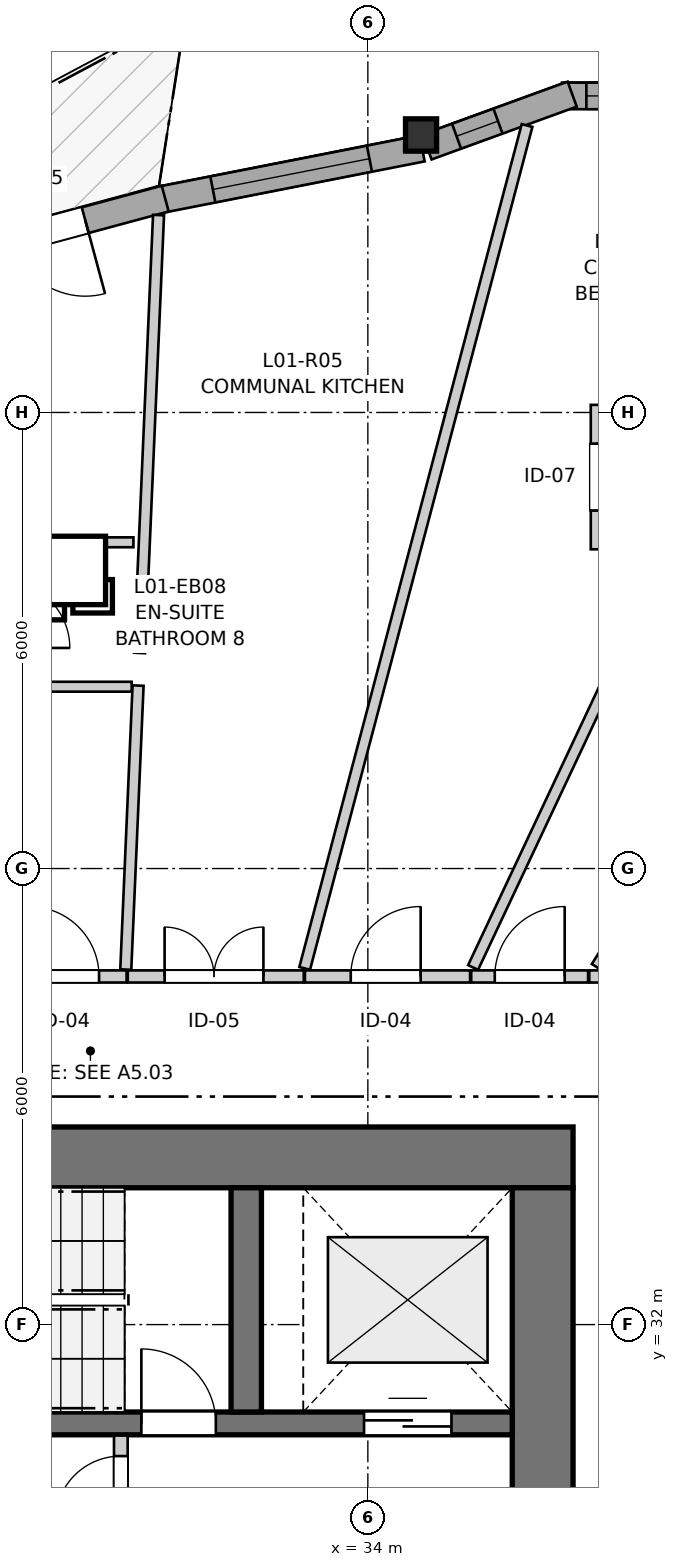
"""IFC4 building model, lengths in metres.
Left out: names, types, materials, properties, quantities, classifications, styles, units other than length and angle.
Written with IfcOpenShell. Run it as: python <this file> out.ifc"""

import sys

from ifc_helpers import new_model, si_unit, direction, frame, frame_2d, origin, origin_2d, place, context, subcontext, project, spatial, rectangle, i_section, extrude, source, transform, mapped, element, fill, save


model = new_model("IFC4")
c1 = context("Model", 3, precision=1e-05, world=origin(), true_north=direction((0.0, 1.0)))
c2 = subcontext(c1, "Body", "Model", "MODEL_VIEW")
j1 = project(units=[si_unit("LENGTHUNIT", "METRE"), si_unit("PLANEANGLEUNIT", "RADIAN")], contexts=[c1])
p1 = place(None, origin())
s1 = spatial("IfcSite", under=j1, at=p1, CompositionType="ELEMENT")
p2 = place(p1, origin())
s2 = spatial("IfcBuilding", under=s1, at=p2, CompositionType="ELEMENT")
p3 = place(p2, frame((0.0, 0.0, 7.8)))
s3 = spatial("IfcBuildingStorey", under=s2, at=p3, CompositionType="ELEMENT", Elevation=7.8)
p4 = place(p3, frame((36.7, 34.2, 0.0), z_axis=(0.0, 0.0, 1.0), x_axis=(-1.0, 0.0, 0.0)))
e1 = element("IfcWall", 1, at=p4, inside=s3, PredefinedType="SHEAR", context=c2, shape_type="SweptSolid", body=[
    extrude(rectangle(XDim=12.7, YDim=0.8, at=frame_2d((6.35, 0.0))), origin(), (0.0, 0.0, 1.0), 2.94),
])
p5 = place(p3, frame((36.3, 18.2, 0.0), z_axis=(0.0, 0.0, 1.0), x_axis=(0.0, 1.0, 0.0)))
e2 = element("IfcWall", 2, at=p5, inside=s3, PredefinedType="SHEAR", context=c2, shape_type="SweptSolid", body=[
    extrude(rectangle(XDim=15.6, YDim=0.8, at=frame_2d((7.8, 0.0))), origin(), (0.0, 0.0, 1.0), 2.94),
])
p6 = place(p5, frame((4.25, 0.0, 0.0)))
e3 = element("IfcOpeningElement", 3, at=p6, cuts=e2, PredefinedType="OPENING", context=c2, shape_type="SweptSolid", body=[
    extrude(rectangle(XDim=1.1, YDim=2.15, at=frame_2d((0.55, 1.075))), frame((0.0, 0.41, 0.0), z_axis=(0.0, -1.0, 0.0), x_axis=(1.0, 0.0, 0.0)), (0.0, 0.0, 1.0), 0.82),
])
p7 = place(p5, frame((10.25, 0.0, 0.0)))
e4 = element("IfcOpeningElement", 4, at=p7, cuts=e2, PredefinedType="OPENING", context=c2, shape_type="SweptSolid", body=[
    extrude(rectangle(XDim=1.1, YDim=2.15, at=frame_2d((0.55, 1.075))), frame((0.0, 0.41, 0.0), z_axis=(0.0, -1.0, 0.0), x_axis=(1.0, 0.0, 0.0)), (0.0, 0.0, 1.0), 0.82),
])
p8 = place(p3, frame((24.8, 30.7, 0.0), z_axis=(0.0, 0.0, 1.0), x_axis=(1.0, 0.0, 0.0)))
e5 = element("IfcWall", 5, at=p8, inside=s3, PredefinedType="SHEAR", context=c2, shape_type="SweptSolid", body=[
    extrude(rectangle(XDim=11.1, YDim=0.3, at=frame_2d((5.55, 0.0))), origin(), (0.0, 0.0, 1.0), 2.94),
])
p9 = place(p8, frame((6.22, 0.0, 0.0)))
e6 = element("IfcOpeningElement", 6, at=p9, cuts=e5, PredefinedType="OPENING", context=c2, shape_type="SweptSolid", body=[
    extrude(rectangle(XDim=0.98, YDim=2.15, at=frame_2d((0.49, 1.075))), frame((0.0, 0.16, 0.0), z_axis=(0.0, -1.0, 0.0), x_axis=(1.0, 0.0, 0.0)), (0.0, 0.0, 1.0), 0.32),
])
p10 = place(p8, frame((9.15, 0.0, 0.0)))
e7 = element("IfcOpeningElement", 7, at=p10, cuts=e5, PredefinedType="OPENING", context=c2, shape_type="SweptSolid", body=[
    extrude(rectangle(XDim=1.15, YDim=2.15, at=frame_2d((0.575, 1.075))), frame((0.0, 0.16, 0.0), z_axis=(0.0, -1.0, 0.0), x_axis=(1.0, 0.0, 0.0)), (0.0, 0.0, 1.0), 0.32),
])
p11 = place(p3, frame((32.4, 30.85, 0.0), z_axis=(0.0, 0.0, 1.0), x_axis=(0.0, 1.0, 0.0)))
e8 = element("IfcWall", 8, at=p11, inside=s3, PredefinedType="SHEAR", context=c2, shape_type="SweptSolid", body=[
    extrude(rectangle(XDim=2.95, YDim=0.4, at=frame_2d((1.475, 0.0))), origin(), (0.0, 0.0, 1.0), 2.94),
])
m1 = source(origin(), c2, "Body", "SweptSolid", [
    extrude(i_section(OverallWidth=0.409, OverallDepth=0.425, WebThickness=0.03, FlangeThickness=0.048, FilletRadius=0.015, at=origin_2d()), origin(), (0.0, 0.0, 1.0), 2.94),
])
p12 = place(p3, frame((34.7, 47.651, 0.0), z_axis=(0.0, 0.0, 1.0), x_axis=(1.0, 0.0, 0.0)))
e9 = element("IfcColumn", 9, at=p12, inside=s3, PredefinedType="PILASTER", context=c2, shape_type="MappedRepresentation", body=[
    mapped(m1, transform((0.0, 0.0, 0.0), x_axis=(1.0, 0.0, 0.0), y_axis=(0.0, 1.0, 0.0), z_axis=(0.0, 0.0, 1.0), scale=1.0)),
])
p13 = place(p3, frame((38.645, 48.165, 0.0), z_axis=(0.0, 0.0, 1.0), x_axis=(-1.0, 0.0, 0.0)))
e10 = element("IfcWall", 10, at=p13, inside=s3, PredefinedType="SOLIDWALL", context=c2, shape_type="SweptSolid", body=[
    extrude(rectangle(XDim=2.091, YDim=0.35, at=frame_2d((1.045, 0.0))), origin(), (0.0, 0.0, 1.0), 2.42),
])
p14 = place(p13, frame((0.32, 0.0, 0.82)))
e11 = element("IfcOpeningElement", 11, at=p14, cuts=e10, PredefinedType="OPENING", context=c2, shape_type="SweptSolid", body=[
    extrude(rectangle(XDim=1.45, YDim=1.25, at=frame_2d((0.725, 0.625))), frame((0.0, 0.185, 0.0), z_axis=(0.0, -1.0, 0.0), x_axis=(1.0, 0.0, 0.0)), (0.0, 0.0, 1.0), 0.37),
])
p15 = place(p3, frame((36.688, 48.188, 0.0), z_axis=(0.0, 0.0, 1.0), x_axis=(-0.939653047052, -0.342128851701, 0.0)))
e12 = element("IfcWall", 12, at=p15, inside=s3, PredefinedType="SOLIDWALL", context=c2, shape_type="SweptSolid", body=[
    extrude(rectangle(XDim=2.032, YDim=0.35, at=frame_2d((1.016, 0.0))), origin(), (0.0, 0.0, 1.0), 2.42),
])
p16 = place(p15, frame((1.039, 0.0, 0.82)))
e13 = element("IfcOpeningElement", 13, at=p16, cuts=e12, PredefinedType="OPENING", context=c2, shape_type="SweptSolid", body=[
    extrude(rectangle(XDim=0.58, YDim=1.35, at=frame_2d((0.29, 0.675))), frame((0.0, 0.185, 0.0), z_axis=(0.0, -1.0, 0.0), x_axis=(1.0, 0.0, 0.0)), (0.0, 0.0, 1.0), 0.37),
])
p17 = place(p3, frame((34.714, 47.475, 0.0), z_axis=(0.0, 0.0, 1.0), x_axis=(-0.981221268425, -0.192885516282, 0.0)))
e14 = element("IfcWall", 14, at=p17, inside=s3, PredefinedType="SOLIDWALL", context=c2, shape_type="SweptSolid", body=[
    extrude(rectangle(XDim=3.533, YDim=0.35, at=frame_2d((1.766, 0.0))), origin(), (0.0, 0.0, 1.0), 2.42),
])
p18 = place(p17, frame((0.706, 0.0, 0.82)))
e15 = element("IfcOpeningElement", 15, at=p18, cuts=e14, PredefinedType="OPENING", context=c2, shape_type="SweptSolid", body=[
    extrude(rectangle(XDim=2.1, YDim=1.4, at=frame_2d((1.05, 0.7))), frame((0.0, 0.185, 0.0), z_axis=(0.0, -1.0, 0.0), x_axis=(1.0, 0.0, 0.0)), (0.0, 0.0, 1.0), 0.37),
])
p19 = place(p3, frame((31.333, 46.814, 0.0), z_axis=(0.0, 0.0, 1.0), x_axis=(-0.965456905924, -0.260562780926, 0.0)))
e16 = element("IfcWall", 16, at=p19, inside=s3, PredefinedType="SOLIDWALL", context=c2, shape_type="SweptSolid", body=[
    extrude(rectangle(XDim=3.179, YDim=0.35, at=frame_2d((1.59, 0.0))), origin(), (0.0, 0.0, 1.0), 2.42),
])
p20 = place(p19, frame((1.09, 0.0, 0.0)))
e17 = element("IfcOpeningElement", 17, at=p20, cuts=e16, PredefinedType="OPENING", context=c2, shape_type="SweptSolid", body=[
    extrude(rectangle(XDim=1.0, YDim=2.1, at=frame_2d((0.5, 1.05))), frame((0.0, 0.185, 0.0), z_axis=(0.0, -1.0, 0.0), x_axis=(1.0, 0.0, 0.0)), (0.0, 0.0, 1.0), 0.37),
])
p21 = place(p3, frame((30.75, 27.43, 0.0), z_axis=(0.0, 0.0, 1.0), x_axis=(0.0, 1.0, 0.0)))
e18 = element("IfcWall", 18, at=p21, inside=s3, PredefinedType="PARTITIONING", context=c2, shape_type="SweptSolid", body=[
    extrude(rectangle(XDim=3.11, YDim=0.18, at=frame_2d((1.555, 0.0))), origin(), (0.0, 0.0, 1.0), 2.94),
])
p22 = place(p21, frame((1.98, 0.0, 0.0)))
e19 = element("IfcOpeningElement", 19, at=p22, cuts=e18, PredefinedType="OPENING", context=c2, shape_type="SweptSolid", body=[
    extrude(rectangle(XDim=0.86, YDim=2.05, at=frame_2d((0.43, 1.025))), frame((0.0, 0.1, 0.0), z_axis=(0.0, -1.0, 0.0), x_axis=(1.0, 0.0, 0.0)), (0.0, 0.0, 1.0), 0.2),
])
p23 = place(p3, frame((27.756, 36.58, 0.0), z_axis=(0.0, 0.0, 1.0), x_axis=(1.0, 0.0, 0.0)))
e20 = element("IfcWall", 20, at=p23, inside=s3, PredefinedType="PARTITIONING", context=c2, shape_type="SweptSolid", body=[
    extrude(rectangle(XDim=3.07, YDim=0.16, at=frame_2d((1.535, 0.0))), origin(), (0.0, 0.0, 1.0), 2.94),
])
p24 = place(p23, frame((1.788, 0.0, 0.0)))
e21 = element("IfcOpeningElement", 21, at=p24, cuts=e20, PredefinedType="OPENING", context=c2, shape_type="SweptSolid", body=[
    extrude(rectangle(XDim=0.92, YDim=2.1, at=frame_2d((0.46, 1.05))), frame((0.0, 0.09, 0.0), z_axis=(0.0, -1.0, 0.0), x_axis=(1.0, 0.0, 0.0)), (0.0, 0.0, 1.0), 0.18),
])
p25 = place(p3, frame((30.841, 36.58, 0.0), z_axis=(0.0, 0.0, 1.0), x_axis=(1.0, 0.0, 0.0)))
e22 = element("IfcWall", 22, at=p25, inside=s3, PredefinedType="PARTITIONING", context=c2, shape_type="SweptSolid", body=[
    extrude(rectangle(XDim=2.316, YDim=0.16, at=frame_2d((1.158, 0.0))), origin(), (0.0, 0.0, 1.0), 2.94),
])
p26 = place(p25, frame((0.485, 0.0, 0.0)))
e23 = element("IfcOpeningElement", 23, at=p26, cuts=e22, PredefinedType="OPENING", context=c2, shape_type="SweptSolid", body=[
    extrude(rectangle(XDim=1.3, YDim=2.1, at=frame_2d((0.65, 1.05))), frame((0.0, 0.09, 0.0), z_axis=(0.0, -1.0, 0.0), x_axis=(1.0, 0.0, 0.0)), (0.0, 0.0, 1.0), 0.18),
])
p27 = place(p3, frame((33.172, 36.58, 0.0), z_axis=(0.0, 0.0, 1.0), x_axis=(1.0, 0.0, 0.0)))
e24 = element("IfcWall", 24, at=p27, inside=s3, PredefinedType="PARTITIONING", context=c2, shape_type="SweptSolid", body=[
    extrude(rectangle(XDim=2.173, YDim=0.16, at=frame_2d((1.086, 0.0))), origin(), (0.0, 0.0, 1.0), 2.94),
])
p28 = place(p27, frame((0.603, 0.0, 0.0)))
e25 = element("IfcOpeningElement", 25, at=p28, cuts=e24, PredefinedType="OPENING", context=c2, shape_type="SweptSolid", body=[
    extrude(rectangle(XDim=0.92, YDim=2.1, at=frame_2d((0.46, 1.05))), frame((0.0, 0.09, 0.0), z_axis=(0.0, -1.0, 0.0), x_axis=(1.0, 0.0, 0.0)), (0.0, 0.0, 1.0), 0.18),
])
p29 = place(p3, frame((36.998, 44.1, 0.0), z_axis=(0.0, 0.0, 1.0), x_axis=(0.0, -1.0, 0.0)))
e26 = element("IfcWall", 26, at=p29, inside=s3, PredefinedType="PARTITIONING", context=c2, shape_type="SweptSolid", body=[
    extrude(rectangle(XDim=1.9, YDim=0.13, at=frame_2d((0.95, 0.0))), origin(), (0.0, 0.0, 1.0), 2.94),
])
p30 = place(p29, frame((0.51, 0.0, 0.0)))
e27 = element("IfcOpeningElement", 27, at=p30, cuts=e26, PredefinedType="OPENING", context=c2, shape_type="SweptSolid", body=[
    extrude(rectangle(XDim=0.88, YDim=2.05, at=frame_2d((0.44, 1.025))), frame((0.0, 0.075, 0.0), z_axis=(0.0, -1.0, 0.0), x_axis=(1.0, 0.0, 0.0)), (0.0, 0.0, 1.0), 0.15),
])
p31 = place(p3, frame((36.913, 36.58, 0.0), z_axis=(0.0, 0.0, 1.0), x_axis=(1.0, 0.0, 0.0)))
e28 = element("IfcWall", 28, at=p31, inside=s3, PredefinedType="PARTITIONING", context=c2, shape_type="SweptSolid", body=[
    extrude(rectangle(XDim=1.767, YDim=0.16, at=frame_2d((0.883, 0.0))), origin(), (0.0, 0.0, 1.0), 2.94),
])
p32 = place(p31, frame((0.22, 0.0, 0.0)))
e29 = element("IfcOpeningElement", 29, at=p32, cuts=e28, PredefinedType="OPENING", context=c2, shape_type="SweptSolid", body=[
    extrude(rectangle(XDim=0.92, YDim=2.1, at=frame_2d((0.46, 1.05))), frame((0.0, 0.09, 0.0), z_axis=(0.0, -1.0, 0.0), x_axis=(1.0, 0.0, 0.0)), (0.0, 0.0, 1.0), 0.18),
])
p33 = place(p3, frame((35.36, 36.58, 0.0), z_axis=(0.0, 0.0, 1.0), x_axis=(1.0, 0.0, 0.0)))
e30 = element("IfcWall", 30, at=p33, inside=s3, PredefinedType="PARTITIONING", context=c2, shape_type="SweptSolid", body=[
    extrude(rectangle(XDim=1.538, YDim=0.16, at=frame_2d((0.769, 0.0))), origin(), (0.0, 0.0, 1.0), 2.94),
])
p34 = place(p33, frame((0.31, 0.0, 0.0)))
e31 = element("IfcOpeningElement", 31, at=p34, cuts=e30, PredefinedType="OPENING", context=c2, shape_type="SweptSolid", body=[
    extrude(rectangle(XDim=0.92, YDim=2.1, at=frame_2d((0.46, 1.05))), frame((0.0, 0.09, 0.0), z_axis=(0.0, -1.0, 0.0), x_axis=(1.0, 0.0, 0.0)), (0.0, 0.0, 1.0), 0.18),
])
p35 = place(p3, frame((33.169, 36.686, 0.0), z_axis=(0.0, 0.0, 1.0), x_axis=(0.255112522394, 0.966911371801, 0.0)))
e32 = element("IfcWall", 32, at=p35, inside=s3, PredefinedType="PARTITIONING", context=c2, shape_type="SweptSolid", body=[
    extrude(rectangle(XDim=11.469, YDim=0.145, at=frame_2d((5.734, 0.0))), origin(), (0.0, 0.0, 1.0), 2.94),
])
p36 = place(p3, frame((37.009, 36.705, 0.0), z_axis=(0.0, 0.0, 1.0), x_axis=(0.528183829193, 0.849130050451, 0.0)))
e33 = element("IfcWall", 33, at=p36, inside=s3, PredefinedType="PARTITIONING", context=c2, shape_type="SweptSolid", body=[
    extrude(rectangle(XDim=10.005, YDim=0.145, at=frame_2d((5.003, 0.0))), origin(), (0.0, 0.0, 1.0), 2.94),
])
p37 = place(p3, frame((35.385, 36.698, 0.0), z_axis=(0.0, 0.0, 1.0), x_axis=(0.425687116038, 0.904870421242, 0.0)))
e34 = element("IfcWall", 34, at=p37, inside=s3, PredefinedType="PARTITIONING", context=c2, shape_type="SweptSolid", body=[
    extrude(rectangle(XDim=6.097, YDim=0.145, at=frame_2d((3.049, 0.0))), origin(), (0.0, 0.0, 1.0), 2.94),
])
p38 = place(p3, frame((30.996, 40.836, 0.0), z_axis=(0.0, 0.0, 1.0), x_axis=(0.043354544378, 0.999059749706, 0.0)))
e35 = element("IfcWall", 35, at=p38, inside=s3, PredefinedType="PARTITIONING", context=c2, shape_type="SweptSolid", body=[
    extrude(rectangle(XDim=5.766, YDim=0.145, at=frame_2d((2.883, 0.0))), origin(), (0.0, 0.0, 1.0), 2.94),
])
p39 = place(p3, frame((30.815, 36.671, 0.0), z_axis=(0.0, 0.0, 1.0), x_axis=(0.043352224588, 0.999059850371, 0.0)))
e36 = element("IfcWall", 36, at=p39, inside=s3, PredefinedType="PARTITIONING", context=c2, shape_type="SweptSolid", body=[
    extrude(rectangle(XDim=3.739, YDim=0.145, at=frame_2d((1.87, 0.0))), origin(), (0.0, 0.0, 1.0), 2.94),
])
p40 = place(p3, frame((29.272, 42.292, 0.0), z_axis=(0.0, 0.0, 1.0), x_axis=(1.0, 0.0, 0.0)))
e37 = element("IfcWall", 37, at=p40, inside=s3, PredefinedType="PARTITIONING", context=c2, shape_type="SweptSolid", body=[
    extrude(rectangle(XDim=1.644, YDim=0.13, at=frame_2d((0.822, 0.0))), origin(), (0.0, 0.0, 1.0), 2.508),
])
p41 = place(p3, frame((29.272, 40.392, 0.0), z_axis=(0.0, 0.0, 1.0), x_axis=(1.0, 0.0, 0.0)))
e38 = element("IfcWall", 38, at=p41, inside=s3, PredefinedType="PARTITIONING", context=c2, shape_type="SweptSolid", body=[
    extrude(rectangle(XDim=1.621, YDim=0.13, at=frame_2d((0.81, 0.0))), origin(), (0.0, 0.0, 1.0), 2.94),
])
m2 = source(origin(), c2, "Body", "SweptSolid", [
    extrude(rectangle(XDim=1.45, YDim=1.25, at=frame_2d((0.725, 0.625))), frame((0.0, 0.03, 0.0), z_axis=(0.0, -1.0, 0.0), x_axis=(1.0, 0.0, 0.0)), (0.0, 0.0, 1.0), 0.06),
])
p42 = place(p14, origin())
e39 = element("IfcWindow", 39, at=p42, inside=s3, PartitioningType="SINGLE_PANEL", PredefinedType="WINDOW", context=c2, shape_type="MappedRepresentation", body=[
    mapped(m2, transform((0.0, 0.0, 0.0), x_axis=(1.0, 0.0, 0.0), y_axis=(0.0, 1.0, 0.0), z_axis=(0.0, 0.0, 1.0), scale=1.0)),
])
fill(e11, e39)
m3 = source(origin(), c2, "Body", "SweptSolid", [
    extrude(rectangle(XDim=0.58, YDim=1.35, at=frame_2d((0.29, 0.675))), frame((0.0, 0.03, 0.0), z_axis=(0.0, -1.0, 0.0), x_axis=(1.0, 0.0, 0.0)), (0.0, 0.0, 1.0), 0.06),
])
p43 = place(p16, origin())
e40 = element("IfcWindow", 40, at=p43, inside=s3, PartitioningType="SINGLE_PANEL", PredefinedType="WINDOW", context=c2, shape_type="MappedRepresentation", body=[
    mapped(m3, transform((0.0, 0.0, 0.0), x_axis=(1.0, 0.0, 0.0), y_axis=(0.0, 1.0, 0.0), z_axis=(0.0, 0.0, 1.0), scale=1.0)),
])
fill(e13, e40)
m4 = source(origin(), c2, "Body", "SweptSolid", [
    extrude(rectangle(XDim=2.1, YDim=1.4, at=frame_2d((1.05, 0.7))), frame((0.0, 0.03, 0.0), z_axis=(0.0, -1.0, 0.0), x_axis=(1.0, 0.0, 0.0)), (0.0, 0.0, 1.0), 0.06),
])
p44 = place(p18, origin())
e41 = element("IfcWindow", 41, at=p44, inside=s3, PartitioningType="SINGLE_PANEL", PredefinedType="WINDOW", context=c2, shape_type="MappedRepresentation", body=[
    mapped(m4, transform((0.0, 0.0, 0.0), x_axis=(1.0, 0.0, 0.0), y_axis=(0.0, 1.0, 0.0), z_axis=(0.0, 0.0, 1.0), scale=1.0)),
])
fill(e15, e41)
m5 = source(origin(), c2, "Body", "SweptSolid", [
    extrude(rectangle(XDim=1.0, YDim=2.1, at=frame_2d((0.5, 1.05))), frame((0.0, 0.025, 0.0), z_axis=(0.0, -1.0, 0.0), x_axis=(1.0, 0.0, 0.0)), (0.0, 0.0, 1.0), 0.05),
])
p45 = place(p20, origin())
e42 = element("IfcDoor", 42, at=p45, inside=s3, OperationType="SINGLE_SWING_LEFT", PredefinedType="DOOR", context=c2, shape_type="MappedRepresentation", body=[
    mapped(m5, transform((0.0, 0.0, 0.0), x_axis=(1.0, 0.0, 0.0), y_axis=(0.0, 1.0, 0.0), z_axis=(0.0, 0.0, 1.0), scale=1.0)),
])
fill(e17, e42)
m6 = source(origin(), c2, "Body", "SweptSolid", [
    extrude(rectangle(XDim=0.98, YDim=2.15, at=frame_2d((0.49, 1.075))), frame((0.0, 0.025, 0.0), z_axis=(0.0, -1.0, 0.0), x_axis=(1.0, 0.0, 0.0)), (0.0, 0.0, 1.0), 0.05),
])
p46 = place(p9, origin())
e43 = element("IfcDoor", 43, at=p46, inside=s3, OperationType="SINGLE_SWING_LEFT", PredefinedType="DOOR", context=c2, shape_type="MappedRepresentation", body=[
    mapped(m6, transform((0.0, 0.0, 0.0), x_axis=(1.0, 0.0, 0.0), y_axis=(0.0, 1.0, 0.0), z_axis=(0.0, 0.0, 1.0), scale=1.0)),
])
fill(e6, e43)
m7 = source(origin(), c2, "Body", "SweptSolid", [
    extrude(rectangle(XDim=1.15, YDim=2.15, at=frame_2d((0.575, 1.075))), frame((0.0, 0.025, 0.0), z_axis=(0.0, -1.0, 0.0), x_axis=(1.0, 0.0, 0.0)), (0.0, 0.0, 1.0), 0.05),
])
p47 = place(p10, origin())
e44 = element("IfcDoor", 44, at=p47, inside=s3, OperationType="DOUBLE_DOOR_SLIDING", PredefinedType="DOOR", context=c2, shape_type="MappedRepresentation", body=[
    mapped(m7, transform((0.0, 0.0, 0.0), x_axis=(1.0, 0.0, 0.0), y_axis=(0.0, 1.0, 0.0), z_axis=(0.0, 0.0, 1.0), scale=1.0)),
])
fill(e7, e44)
m8 = source(origin(), c2, "Body", "SweptSolid", [
    extrude(rectangle(XDim=0.86, YDim=2.05, at=frame_2d((0.43, 1.025))), frame((0.0, 0.025, 0.0), z_axis=(0.0, -1.0, 0.0), x_axis=(1.0, 0.0, 0.0)), (0.0, 0.0, 1.0), 0.05),
])
p48 = place(p22, origin())
e45 = element("IfcDoor", 45, at=p48, inside=s3, OperationType="SINGLE_SWING_LEFT", PredefinedType="DOOR", context=c2, shape_type="MappedRepresentation", body=[
    mapped(m8, transform((0.0, 0.0, 0.0), x_axis=(1.0, 0.0, 0.0), y_axis=(0.0, 1.0, 0.0), z_axis=(0.0, 0.0, 1.0), scale=1.0)),
])
fill(e19, e45)
m9 = source(origin(), c2, "Body", "SweptSolid", [
    extrude(rectangle(XDim=0.92, YDim=2.1, at=frame_2d((0.46, 1.05))), frame((0.0, 0.025, 0.0), z_axis=(0.0, -1.0, 0.0), x_axis=(1.0, 0.0, 0.0)), (0.0, 0.0, 1.0), 0.05),
])
p49 = place(p24, origin())
e46 = element("IfcDoor", 46, at=p49, inside=s3, OperationType="SINGLE_SWING_LEFT", PredefinedType="DOOR", context=c2, shape_type="MappedRepresentation", body=[
    mapped(m9, transform((0.0, 0.0, 0.0), x_axis=(1.0, 0.0, 0.0), y_axis=(0.0, 1.0, 0.0), z_axis=(0.0, 0.0, 1.0), scale=1.0)),
])
fill(e21, e46)
m10 = source(origin(), c2, "Body", "SweptSolid", [
    extrude(rectangle(XDim=1.3, YDim=2.1, at=frame_2d((0.65, 1.05))), frame((0.0, 0.025, 0.0), z_axis=(0.0, -1.0, 0.0), x_axis=(1.0, 0.0, 0.0)), (0.0, 0.0, 1.0), 0.05),
])
p50 = place(p26, origin())
e47 = element("IfcDoor", 47, at=p50, inside=s3, OperationType="DOUBLE_DOOR_SINGLE_SWING", PredefinedType="DOOR", context=c2, shape_type="MappedRepresentation", body=[
    mapped(m10, transform((0.0, 0.0, 0.0), x_axis=(1.0, 0.0, 0.0), y_axis=(0.0, 1.0, 0.0), z_axis=(0.0, 0.0, 1.0), scale=1.0)),
])
fill(e23, e47)
p51 = place(p28, origin())
e48 = element("IfcDoor", 48, at=p51, inside=s3, OperationType="SINGLE_SWING_RIGHT", PredefinedType="DOOR", context=c2, shape_type="MappedRepresentation", body=[
    mapped(m9, transform((0.0, 0.0, 0.0), x_axis=(1.0, 0.0, 0.0), y_axis=(0.0, 1.0, 0.0), z_axis=(0.0, 0.0, 1.0), scale=1.0)),
])
fill(e25, e48)
m11 = source(origin(), c2, "Body", "SweptSolid", [
    extrude(rectangle(XDim=0.88, YDim=2.05, at=frame_2d((0.44, 1.025))), frame((0.0, 0.025, 0.0), z_axis=(0.0, -1.0, 0.0), x_axis=(1.0, 0.0, 0.0)), (0.0, 0.0, 1.0), 0.05),
])
p52 = place(p30, origin())
e49 = element("IfcDoor", 49, at=p52, inside=s3, OperationType="SINGLE_SWING_LEFT", PredefinedType="DOOR", context=c2, shape_type="MappedRepresentation", body=[
    mapped(m11, transform((0.0, 0.0, 0.0), x_axis=(1.0, 0.0, 0.0), y_axis=(0.0, 1.0, 0.0), z_axis=(0.0, 0.0, 1.0), scale=1.0)),
])
fill(e27, e49)
p53 = place(p34, origin())
e50 = element("IfcDoor", 50, at=p53, inside=s3, OperationType="SINGLE_SWING_RIGHT", PredefinedType="DOOR", context=c2, shape_type="MappedRepresentation", body=[
    mapped(m9, transform((0.0, 0.0, 0.0), x_axis=(1.0, 0.0, 0.0), y_axis=(0.0, 1.0, 0.0), z_axis=(0.0, 0.0, 1.0), scale=1.0)),
])
fill(e31, e50)
save(model, sys.argv[1])
